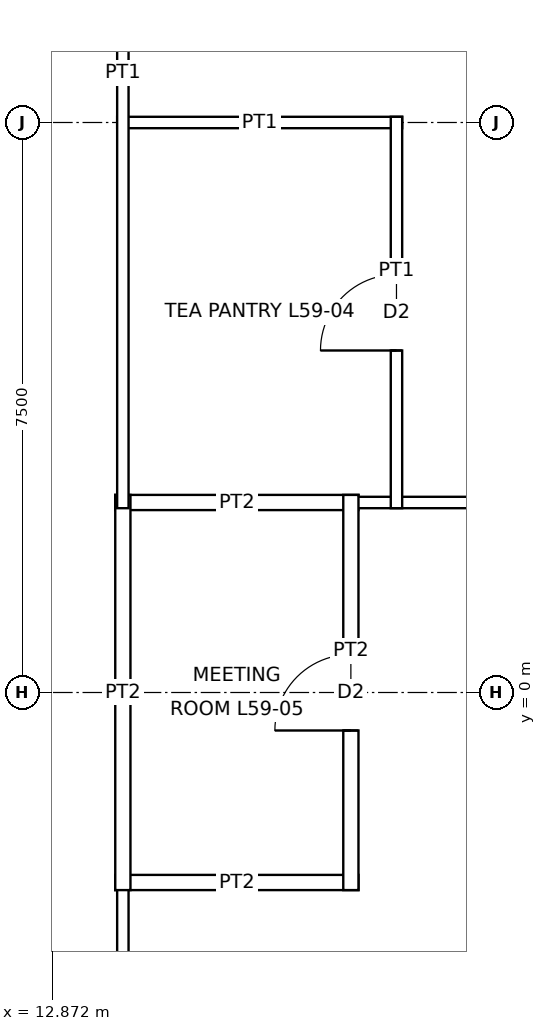
"""IFC4 building model, lengths in metres.
Left out: names, types, materials, properties, quantities, classifications, styles, units other than length and angle.
Written with IfcOpenShell. Run it as: python <this file> out.ifc"""

import sys

from ifc_helpers import new_model, si_unit, direction, frame, frame_2d, origin, place, context, subcontext, project, spatial, rectangle, extrude, element, fill, save


model = new_model("IFC4")
c1 = context("Model", 3, precision=1e-05, world=origin(), true_north=direction((0.0, 1.0)))
c2 = subcontext(c1, "Body", "Model", "MODEL_VIEW")
j1 = project(units=[si_unit("LENGTHUNIT", "METRE"), si_unit("PLANEANGLEUNIT", "RADIAN")], contexts=[c1])
p1 = place(None, origin())
s1 = spatial("IfcSite", under=j1, at=p1, CompositionType="ELEMENT")
p2 = place(p1, origin())
s2 = spatial("IfcBuilding", under=s1, at=p2, CompositionType="ELEMENT")
p3 = place(p2, frame((0.0, 0.0, 271.9)))
s3 = spatial("IfcBuildingStorey", under=s2, at=p3, CompositionType="ELEMENT", Elevation=271.9)
for number, where, z_axis, x_axis in (
    (1, (13.7, -2.5, 0.0), (0.0, 0.0, 1.0), (1.0, 0.0, 0.0)),
    (2, (13.7, 2.5, 0.0), (0.0, 0.0, 1.0), (1.0, 0.0, 0.0)),
):
    element("IfcWall", number, at=place(p3, frame(where, z_axis=z_axis, x_axis=x_axis)), inside=s3, PredefinedType="PARTITIONING", context=c2, shape_type="SweptSolid", body=[
        extrude(rectangle(XDim=3.2, YDim=0.2, at=frame_2d((1.6, 0.0))), origin(), (0.0, 0.0, 1.0), 3.85),
    ])
p4 = place(p3, frame((16.725, 2.5, 0.0), z_axis=(0.0, 0.0, 1.0), x_axis=(1.0, 0.0, 0.0)))
e3 = element("IfcWall", 3, at=p4, inside=s3, PredefinedType="PARTITIONING", context=c2, shape_type="SweptSolid", body=[
    extrude(rectangle(XDim=3.925, YDim=0.15, at=frame_2d((1.962, 0.0))), origin(), (0.0, 0.0, 1.0), 3.85),
])
p5 = place(p3, frame((13.725, 7.5, 0.0), z_axis=(0.0, 0.0, 1.0), x_axis=(1.0, 0.0, 0.0)))
e4 = element("IfcWall", 4, at=p5, inside=s3, PredefinedType="PARTITIONING", context=c2, shape_type="SweptSolid", body=[
    extrude(rectangle(XDim=3.75, YDim=0.15, at=frame_2d((1.875, 0.0))), origin(), (0.0, 0.0, 1.0), 3.243),
])
p6 = place(p3, frame((13.8, -13.875, 0.0), z_axis=(0.0, 0.0, 1.0), x_axis=(0.0, 1.0, 0.0)))
e5 = element("IfcWall", 5, at=p6, inside=s3, PredefinedType="PARTITIONING", context=c2, shape_type="SweptSolid", body=[
    extrude(rectangle(XDim=11.45, YDim=0.15, at=frame_2d((5.725, 0.0))), origin(), (0.0, 0.0, 1.0), 3.85),
])
p7 = place(p6, frame((5.225, 0.0, 0.0)))
e6 = element("IfcOpeningElement", 6, at=p7, cuts=e5, PredefinedType="OPENING", context=c2, shape_type="SweptSolid", body=[
    extrude(rectangle(XDim=1.0, YDim=2.4, at=frame_2d((0.5, 1.2))), frame((0.0, 0.085, 0.0), z_axis=(0.0, -1.0, 0.0), x_axis=(1.0, 0.0, 0.0)), (0.0, 0.0, 1.0), 0.17),
])
p8 = place(p3, frame((13.8, -2.6, 0.0), z_axis=(0.0, 0.0, 1.0), x_axis=(0.0, 1.0, 0.0)))
e7 = element("IfcWall", 7, at=p8, inside=s3, PredefinedType="PARTITIONING", context=c2, shape_type="SweptSolid", body=[
    extrude(rectangle(XDim=5.2, YDim=0.2, at=frame_2d((2.6, 0.0))), origin(), (0.0, 0.0, 1.0), 3.85),
])
p9 = place(p3, frame((13.8, 2.425, 0.0), z_axis=(0.0, 0.0, 1.0), x_axis=(0.0, 1.0, 0.0)))
e8 = element("IfcWall", 8, at=p9, inside=s3, PredefinedType="PARTITIONING", context=c2, shape_type="SweptSolid", body=[
    extrude(rectangle(XDim=11.45, YDim=0.15, at=frame_2d((5.725, 0.0))), origin(), (0.0, 0.0, 1.0), 3.85),
])
p10 = place(p3, frame((16.8, -2.6, 0.0), z_axis=(0.0, 0.0, 1.0), x_axis=(0.0, 1.0, 0.0)))
e9 = element("IfcWall", 9, at=p10, inside=s3, PredefinedType="PARTITIONING", context=c2, shape_type="SweptSolid", body=[
    extrude(rectangle(XDim=5.2, YDim=0.2, at=frame_2d((2.6, 0.0))), origin(), (0.0, 0.0, 1.0), 3.85),
])
p11 = place(p10, frame((2.1, 0.0, 0.0)))
e10 = element("IfcOpeningElement", 10, at=p11, cuts=e9, PredefinedType="OPENING", context=c2, shape_type="SweptSolid", body=[
    extrude(rectangle(XDim=1.0, YDim=2.1, at=frame_2d((0.5, 1.05))), frame((0.0, 0.11, 0.0), z_axis=(0.0, -1.0, 0.0), x_axis=(1.0, 0.0, 0.0)), (0.0, 0.0, 1.0), 0.22),
])
p12 = place(p3, frame((17.4, 2.425, 0.0), z_axis=(0.0, 0.0, 1.0), x_axis=(0.0, 1.0, 0.0)))
e11 = element("IfcWall", 11, at=p12, inside=s3, PredefinedType="PARTITIONING", context=c2, shape_type="SweptSolid", body=[
    extrude(rectangle(XDim=5.15, YDim=0.15, at=frame_2d((2.575, 0.0))), origin(), (0.0, 0.0, 1.0), 3.85),
])
p13 = place(p12, frame((2.075, 0.0, 0.0)))
e12 = element("IfcOpeningElement", 12, at=p13, cuts=e11, PredefinedType="OPENING", context=c2, shape_type="SweptSolid", body=[
    extrude(rectangle(XDim=1.0, YDim=2.1, at=frame_2d((0.5, 1.05))), frame((0.0, 0.085, 0.0), z_axis=(0.0, -1.0, 0.0), x_axis=(1.0, 0.0, 0.0)), (0.0, 0.0, 1.0), 0.17),
])
p14 = place(p13, origin())
e13 = element("IfcDoor", 13, at=p14, inside=s3, OperationType="SINGLE_SWING_LEFT", PredefinedType="DOOR", context=c2, shape_type="SweptSolid", body=[
    extrude(rectangle(XDim=1.0, YDim=2.1, at=frame_2d((0.5, 1.05))), frame((0.0, 0.025, 0.0), z_axis=(0.0, -1.0, 0.0), x_axis=(1.0, 0.0, 0.0)), (0.0, 0.0, 1.0), 0.05),
])
fill(e12, e13)
p15 = place(p11, origin())
e14 = element("IfcDoor", 14, at=p15, inside=s3, OperationType="SINGLE_SWING_LEFT", PredefinedType="DOOR", context=c2, shape_type="SweptSolid", body=[
    extrude(rectangle(XDim=1.0, YDim=2.1, at=frame_2d((0.5, 1.05))), frame((0.0, 0.025, 0.0), z_axis=(0.0, -1.0, 0.0), x_axis=(1.0, 0.0, 0.0)), (0.0, 0.0, 1.0), 0.05),
])
fill(e10, e14)
save(model, sys.argv[1])
